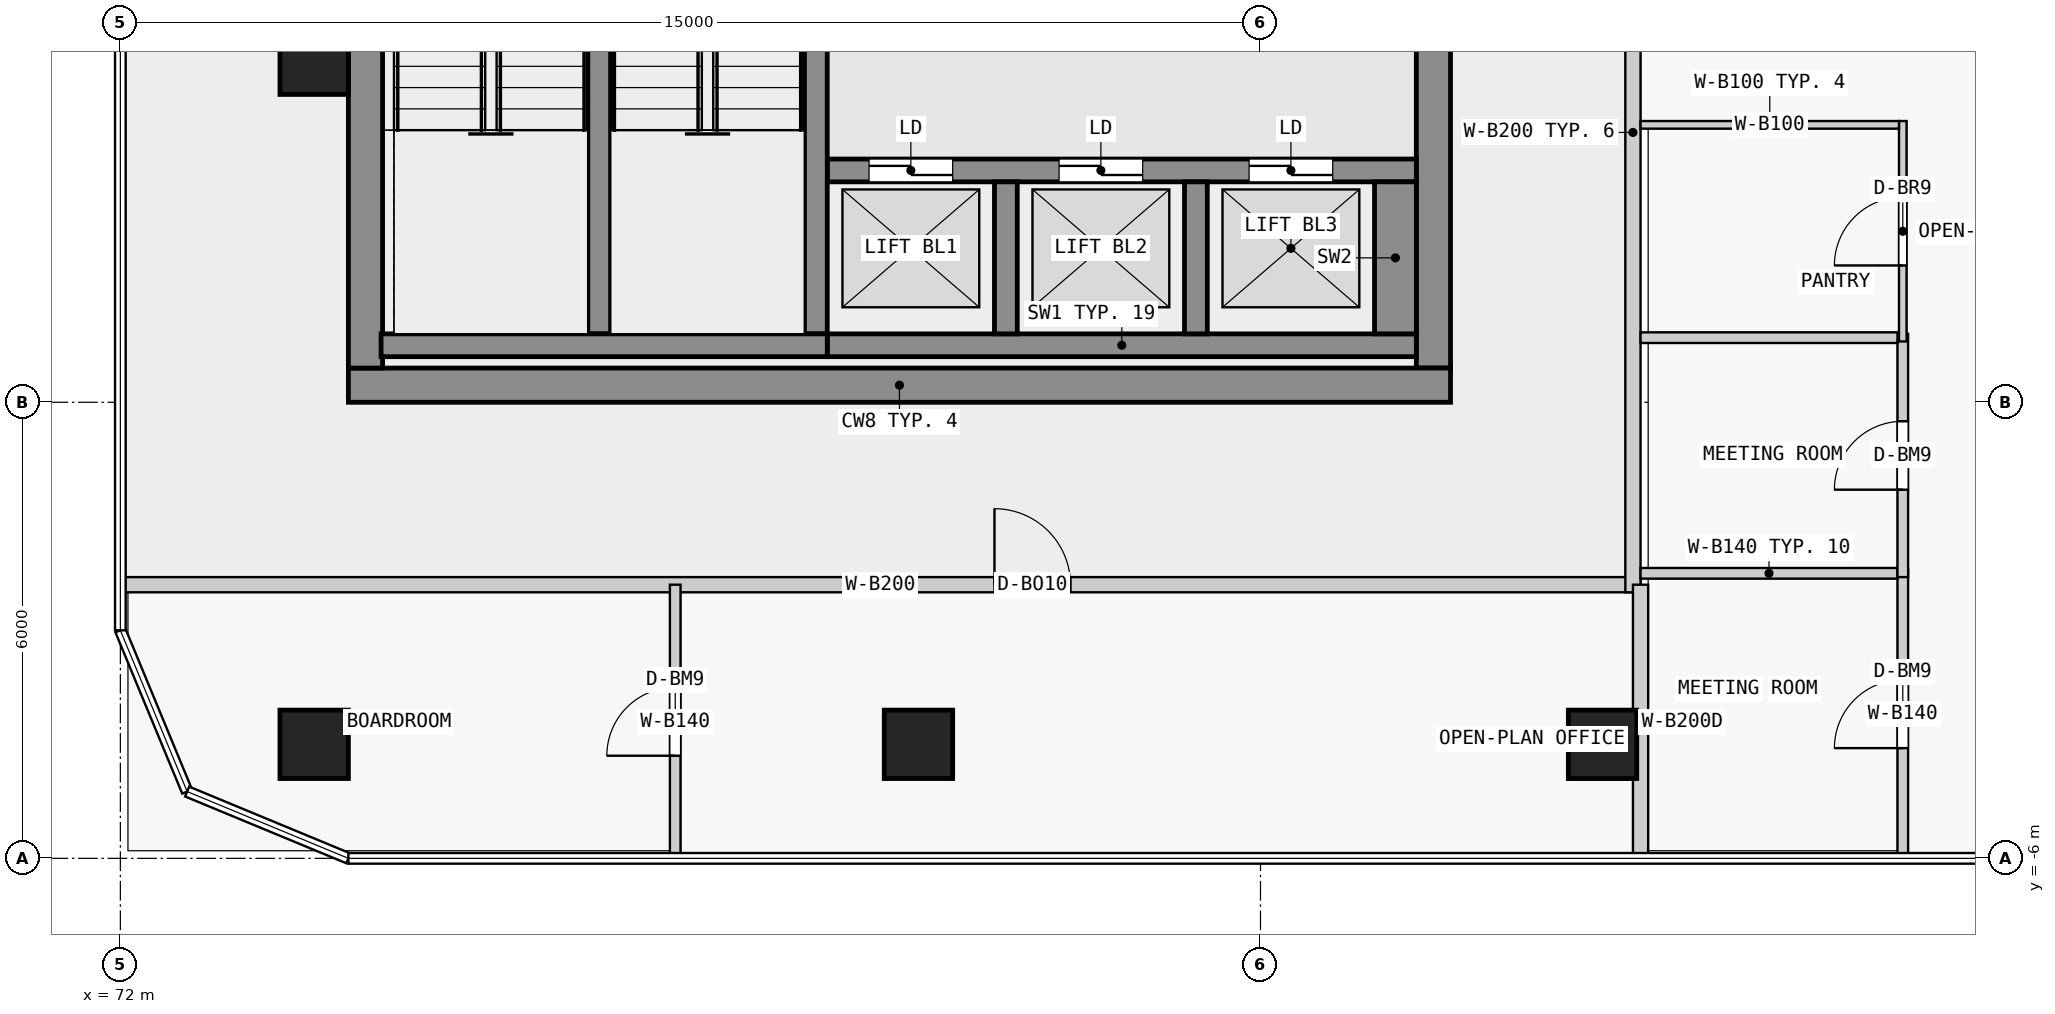
"""IFC4 building model, lengths in metres.
Left out: names, types, materials, properties, quantities, classifications, styles, units other than length and angle.
Written with IfcOpenShell. Run it as: python <this file> out.ifc"""

import sys

from ifc_helpers import new_model, si_unit, direction, frame, frame_2d, origin, origin_2d, place, context, subcontext, project, spatial, rectangle, extrude, element, fill, save


model = new_model("IFC4")
c1 = context("Model", 3, precision=1e-05, world=origin(), true_north=direction((0.0, 1.0)))
c2 = subcontext(c1, "Body", "Model", "MODEL_VIEW")
j1 = project(units=[si_unit("LENGTHUNIT", "METRE"), si_unit("PLANEANGLEUNIT", "RADIAN")], contexts=[c1])
p1 = place(None, origin())
s1 = spatial("IfcSite", under=j1, at=p1, CompositionType="ELEMENT")
p2 = place(p1, origin())
s2 = spatial("IfcBuilding", under=s1, at=p2, CompositionType="ELEMENT")
p3 = place(p2, frame((0.0, 0.0, 78.3)))
s3 = spatial("IfcBuildingStorey", under=s2, at=p3, CompositionType="ELEMENT", Elevation=78.3)
for number, where, z_axis, x_axis in (
    (1, (74.55, -4.5, 0.0), (0.0, 0.0, 1.0), (1.0, 0.0, 0.0)),
    (2, (82.5, -4.5, 0.0), (0.0, 0.0, 1.0), (1.0, 0.0, 0.0)),
    (3, (91.5, -4.5, 0.0), (0.0, 0.0, 1.0), (1.0, 0.0, 0.0)),
    (4, (74.55, 4.5, 0.0), (0.0, 0.0, 1.0), (1.0, 0.0, 0.0)),
):
    element("IfcColumn", number, at=place(p3, frame(where, z_axis=z_axis, x_axis=x_axis)), inside=s3, PredefinedType="COLUMN", context=c2, shape_type="SweptSolid", body=[
        extrude(rectangle(XDim=0.9, YDim=0.9, at=origin_2d()), origin(), (0.0, 0.0, 1.0), 3.5),
    ])
p4 = place(p3, frame((75.0, 0.225, 0.0), z_axis=(0.0, 0.0, 1.0), x_axis=(1.0, 0.0, 0.0)))
e5 = element("IfcWall", 5, at=p4, inside=s3, PredefinedType="SHEAR", context=c2, shape_type="SweptSolid", body=[
    extrude(rectangle(XDim=14.5, YDim=0.45, at=frame_2d((7.25, 0.0))), origin(), (0.0, 0.0, 1.0), 3.25),
])
p5 = place(p3, frame((75.225, 0.45, 0.0), z_axis=(0.0, 0.0, 1.0), x_axis=(0.0, 1.0, 0.0)))
e6 = element("IfcWall", 6, at=p5, inside=s3, PredefinedType="SHEAR", context=c2, shape_type="SweptSolid", body=[
    extrude(rectangle(XDim=17.1, YDim=0.45, at=frame_2d((8.55, 0.0))), origin(), (0.0, 0.0, 1.0), 3.25),
])
p6 = place(p5, frame((7.875, 0.0, 0.0)))
e7 = element("IfcOpeningElement", 7, at=p6, cuts=e6, PredefinedType="OPENING", context=c2, shape_type="SweptSolid", body=[
    extrude(rectangle(XDim=1.8, YDim=2.1, at=frame_2d((0.9, 1.05))), frame((0.0, 0.235, 0.0), z_axis=(0.0, -1.0, 0.0), x_axis=(1.0, 0.0, 0.0)), (0.0, 0.0, 1.0), 0.47),
])
p7 = place(p3, frame((89.275, 0.45, 0.0), z_axis=(0.0, 0.0, 1.0), x_axis=(0.0, 1.0, 0.0)))
e8 = element("IfcWall", 8, at=p7, inside=s3, PredefinedType="SHEAR", context=c2, shape_type="SweptSolid", body=[
    extrude(rectangle(XDim=17.1, YDim=0.45, at=frame_2d((8.55, 0.0))), origin(), (0.0, 0.0, 1.0), 3.25),
])
p8 = place(p7, frame((7.65, 0.0, 0.0)))
e9 = element("IfcOpeningElement", 9, at=p8, cuts=e8, PredefinedType="OPENING", context=c2, shape_type="SweptSolid", body=[
    extrude(rectangle(XDim=1.8, YDim=2.1, at=frame_2d((0.9, 1.05))), frame((0.0, 0.235, 0.0), z_axis=(0.0, -1.0, 0.0), x_axis=(1.0, 0.0, 0.0)), (0.0, 0.0, 1.0), 0.47),
])
p9 = place(p7, frame((15.65, 0.0, 0.0)))
e10 = element("IfcOpeningElement", 10, at=p9, cuts=e8, PredefinedType="OPENING", context=c2, shape_type="SweptSolid", body=[
    extrude(rectangle(XDim=0.9, YDim=2.1, at=frame_2d((0.45, 1.05))), frame((0.0, 0.235, 0.0), z_axis=(0.0, -1.0, 0.0), x_axis=(1.0, 0.0, 0.0)), (0.0, 0.0, 1.0), 0.47),
])
p10 = place(p3, frame((75.43, 0.75, 0.0), z_axis=(0.0, 0.0, 1.0), x_axis=(1.0, 0.0, 0.0)))
e11 = element("IfcWall", 11, at=p10, inside=s3, PredefinedType="SHEAR", context=c2, shape_type="SweptSolid", body=[
    extrude(rectangle(XDim=5.87, YDim=0.3, at=frame_2d((2.935, 0.0))), origin(), (0.0, 0.0, 1.0), 3.25),
])
for number, where, z_axis, x_axis in (
    (12, (78.3, 0.9, 0.0), (0.0, 0.0, 1.0), (0.0, 1.0, 0.0)),
    (13, (81.15, 0.9, 0.0), (0.0, 0.0, 1.0), (0.0, 1.0, 0.0)),
):
    element("IfcWall", number, at=place(p3, frame(where, z_axis=z_axis, x_axis=x_axis)), inside=s3, PredefinedType="SHEAR", context=c2, shape_type="SweptSolid", body=[
        extrude(rectangle(XDim=6.4, YDim=0.3, at=frame_2d((3.2, 0.0))), origin(), (0.0, 0.0, 1.0), 3.25),
    ])
p11 = place(p3, frame((81.3, 0.75, 0.0), z_axis=(0.0, 0.0, 1.0), x_axis=(1.0, 0.0, 0.0)))
e14 = element("IfcWall", 14, at=p11, inside=s3, PredefinedType="SHEAR", context=c2, shape_type="SweptSolid", body=[
    extrude(rectangle(XDim=7.75, YDim=0.3, at=frame_2d((3.875, 0.0))), origin(), (0.0, 0.0, 1.0), 3.25),
])
for number, where, z_axis, x_axis in (
    (15, (83.65, 0.9, 0.0), (0.0, 0.0, 1.0), (0.0, 1.0, 0.0)),
    (16, (86.15, 0.9, 0.0), (0.0, 0.0, 1.0), (0.0, 1.0, 0.0)),
):
    element("IfcWall", number, at=place(p3, frame(where, z_axis=z_axis, x_axis=x_axis)), inside=s3, PredefinedType="SHEAR", context=c2, shape_type="SweptSolid", body=[
        extrude(rectangle(XDim=2.0, YDim=0.3, at=frame_2d((1.0, 0.0))), origin(), (0.0, 0.0, 1.0), 3.25),
    ])
p12 = place(p3, frame((88.775, 0.9, 0.0), z_axis=(0.0, 0.0, 1.0), x_axis=(0.0, 1.0, 0.0)))
e17 = element("IfcWall", 17, at=p12, inside=s3, PredefinedType="SHEAR", context=c2, shape_type="SweptSolid", body=[
    extrude(rectangle(XDim=2.0, YDim=0.55, at=frame_2d((1.0, 0.0))), origin(), (0.0, 0.0, 1.0), 3.25),
])
p13 = place(p3, frame((81.3, 3.05, 0.0), z_axis=(0.0, 0.0, 1.0), x_axis=(1.0, 0.0, 0.0)))
e18 = element("IfcWall", 18, at=p13, inside=s3, PredefinedType="SHEAR", context=c2, shape_type="SweptSolid", body=[
    extrude(rectangle(XDim=7.75, YDim=0.3, at=frame_2d((3.875, 0.0))), origin(), (0.0, 0.0, 1.0), 3.25),
])
p14 = place(p13, frame((0.55, 0.0, 0.0)))
e19 = element("IfcOpeningElement", 19, at=p14, cuts=e18, PredefinedType="OPENING", context=c2, shape_type="SweptSolid", body=[
    extrude(rectangle(XDim=1.1, YDim=2.1, at=frame_2d((0.55, 1.05))), frame((0.0, 0.16, 0.0), z_axis=(0.0, -1.0, 0.0), x_axis=(1.0, 0.0, 0.0)), (0.0, 0.0, 1.0), 0.32),
])
p15 = place(p13, frame((3.05, 0.0, 0.0)))
e20 = element("IfcOpeningElement", 20, at=p15, cuts=e18, PredefinedType="OPENING", context=c2, shape_type="SweptSolid", body=[
    extrude(rectangle(XDim=1.1, YDim=2.1, at=frame_2d((0.55, 1.05))), frame((0.0, 0.16, 0.0), z_axis=(0.0, -1.0, 0.0), x_axis=(1.0, 0.0, 0.0)), (0.0, 0.0, 1.0), 0.32),
])
p16 = place(p13, frame((5.55, 0.0, 0.0)))
e21 = element("IfcOpeningElement", 21, at=p16, cuts=e18, PredefinedType="OPENING", context=c2, shape_type="SweptSolid", body=[
    extrude(rectangle(XDim=1.1, YDim=2.1, at=frame_2d((0.55, 1.05))), frame((0.0, 0.16, 0.0), z_axis=(0.0, -1.0, 0.0), x_axis=(1.0, 0.0, 0.0)), (0.0, 0.0, 1.0), 0.32),
])
p17 = place(p3, frame((72.0, -2.4, 0.0), z_axis=(0.0, 0.0, 1.0), x_axis=(1.0, 0.0, 0.0)))
e22 = element("IfcWall", 22, at=p17, inside=s3, PredefinedType="PARTITIONING", context=c2, shape_type="SweptSolid", body=[
    extrude(rectangle(XDim=20.0, YDim=0.2, at=frame_2d((10.0, 0.0))), origin(), (0.0, 0.0, 1.0), 3.25),
])
p18 = place(p17, frame((11.5, 0.0, 0.0)))
e23 = element("IfcOpeningElement", 23, at=p18, cuts=e22, PredefinedType="OPENING", context=c2, shape_type="SweptSolid", body=[
    extrude(rectangle(XDim=1.0, YDim=2.4, at=frame_2d((0.5, 1.2))), frame((0.0, 0.11, 0.0), z_axis=(0.0, -1.0, 0.0), x_axis=(1.0, 0.0, 0.0)), (0.0, 0.0, 1.0), 0.22),
])
p19 = place(p3, frame((91.9, -2.5, 0.0), z_axis=(0.0, 0.0, 1.0), x_axis=(0.0, 1.0, 0.0)))
e24 = element("IfcWall", 24, at=p19, inside=s3, PredefinedType="PARTITIONING", context=c2, shape_type="SweptSolid", body=[
    extrude(rectangle(XDim=12.1, YDim=0.2, at=frame_2d((6.05, 0.0))), origin(), (0.0, 0.0, 1.0), 3.25),
])
p20 = place(p19, frame((8.3, 0.0, 0.0)))
e25 = element("IfcOpeningElement", 25, at=p20, cuts=e24, PredefinedType="OPENING", context=c2, shape_type="SweptSolid", body=[
    extrude(rectangle(XDim=1.4, YDim=2.4, at=frame_2d((0.7, 1.2))), frame((0.0, 0.11, 0.0), z_axis=(0.0, -1.0, 0.0), x_axis=(1.0, 0.0, 0.0)), (0.0, 0.0, 1.0), 0.22),
])
p21 = place(p3, frame((92.0, -6.0, 0.0), z_axis=(0.0, 0.0, 1.0), x_axis=(0.0, 1.0, 0.0)))
e26 = element("IfcWall", 26, at=p21, inside=s3, PredefinedType="PARTITIONING", context=c2, shape_type="SweptSolid", body=[
    extrude(rectangle(XDim=3.6, YDim=0.2, at=frame_2d((1.8, 0.0))), origin(), (0.0, 0.0, 1.0), 3.25),
])
p22 = place(p3, frame((79.3, -6.0, 0.0), z_axis=(0.0, 0.0, 1.0), x_axis=(0.0, 1.0, 0.0)))
e27 = element("IfcWall", 27, at=p22, inside=s3, PredefinedType="PARTITIONING", context=c2, shape_type="SweptSolid", body=[
    extrude(rectangle(XDim=3.6, YDim=0.14, at=frame_2d((1.8, 0.0))), origin(), (0.0, 0.0, 1.0), 3.25),
])
p23 = place(p22, frame((1.35, 0.0, 0.0)))
e28 = element("IfcOpeningElement", 28, at=p23, cuts=e27, PredefinedType="OPENING", context=c2, shape_type="SweptSolid", body=[
    extrude(rectangle(XDim=0.9, YDim=2.4, at=frame_2d((0.45, 1.2))), frame((0.0, 0.08, 0.0), z_axis=(0.0, -1.0, 0.0), x_axis=(1.0, 0.0, 0.0)), (0.0, 0.0, 1.0), 0.16),
])
p24 = place(p3, frame((95.45, -6.0, 0.0), z_axis=(0.0, 0.0, 1.0), x_axis=(0.0, 1.0, 0.0)))
e29 = element("IfcWall", 29, at=p24, inside=s3, PredefinedType="PARTITIONING", context=c2, shape_type="SweptSolid", body=[
    extrude(rectangle(XDim=3.8, YDim=0.14, at=frame_2d((1.9, 0.0))), origin(), (0.0, 0.0, 1.0), 3.25),
])
p25 = place(p24, frame((1.45, 0.0, 0.0)))
e30 = element("IfcOpeningElement", 30, at=p25, cuts=e29, PredefinedType="OPENING", context=c2, shape_type="SweptSolid", body=[
    extrude(rectangle(XDim=0.9, YDim=2.4, at=frame_2d((0.45, 1.2))), frame((0.0, 0.08, 0.0), z_axis=(0.0, -1.0, 0.0), x_axis=(1.0, 0.0, 0.0)), (0.0, 0.0, 1.0), 0.16),
])
p26 = place(p3, frame((92.0, -2.25, 0.0), z_axis=(0.0, 0.0, 1.0), x_axis=(1.0, 0.0, 0.0)))
e31 = element("IfcWall", 31, at=p26, inside=s3, PredefinedType="PARTITIONING", context=c2, shape_type="SweptSolid", body=[
    extrude(rectangle(XDim=3.38, YDim=0.14, at=frame_2d((1.69, 0.0))), origin(), (0.0, 0.0, 1.0), 3.25),
])
p27 = place(p3, frame((95.45, -2.3, 0.0), z_axis=(0.0, 0.0, 1.0), x_axis=(0.0, 1.0, 0.0)))
e32 = element("IfcWall", 32, at=p27, inside=s3, PredefinedType="PARTITIONING", context=c2, shape_type="SweptSolid", body=[
    extrude(rectangle(XDim=3.2, YDim=0.14, at=frame_2d((1.6, 0.0))), origin(), (0.0, 0.0, 1.0), 3.25),
])
p28 = place(p27, frame((1.15, 0.0, 0.0)))
e33 = element("IfcOpeningElement", 33, at=p28, cuts=e32, PredefinedType="OPENING", context=c2, shape_type="SweptSolid", body=[
    extrude(rectangle(XDim=0.9, YDim=2.4, at=frame_2d((0.45, 1.2))), frame((0.0, 0.08, 0.0), z_axis=(0.0, -1.0, 0.0), x_axis=(1.0, 0.0, 0.0)), (0.0, 0.0, 1.0), 0.16),
])
p29 = place(p3, frame((92.0, 0.85, 0.0), z_axis=(0.0, 0.0, 1.0), x_axis=(1.0, 0.0, 0.0)))
e34 = element("IfcWall", 34, at=p29, inside=s3, PredefinedType="PARTITIONING", context=c2, shape_type="SweptSolid", body=[
    extrude(rectangle(XDim=3.38, YDim=0.14, at=frame_2d((1.69, 0.0))), origin(), (0.0, 0.0, 1.0), 3.25),
])
p30 = place(p3, frame((95.45, 0.8, 0.0), z_axis=(0.0, 0.0, 1.0), x_axis=(0.0, 1.0, 0.0)))
e35 = element("IfcWall", 35, at=p30, inside=s3, PredefinedType="PARTITIONING", context=c2, shape_type="SweptSolid", body=[
    extrude(rectangle(XDim=2.9, YDim=0.1, at=frame_2d((1.45, 0.0))), origin(), (0.0, 0.0, 1.0), 3.25),
])
p31 = place(p30, frame((1.0, 0.0, 0.0)))
e36 = element("IfcOpeningElement", 36, at=p31, cuts=e35, PredefinedType="OPENING", context=c2, shape_type="SweptSolid", body=[
    extrude(rectangle(XDim=0.9, YDim=2.1, at=frame_2d((0.45, 1.05))), frame((0.0, 0.06, 0.0), z_axis=(0.0, -1.0, 0.0), x_axis=(1.0, 0.0, 0.0)), (0.0, 0.0, 1.0), 0.12),
])
p32 = place(p3, frame((92.0, 3.65, 0.0), z_axis=(0.0, 0.0, 1.0), x_axis=(1.0, 0.0, 0.0)))
e37 = element("IfcWall", 37, at=p32, inside=s3, PredefinedType="PARTITIONING", context=c2, shape_type="SweptSolid", body=[
    extrude(rectangle(XDim=3.4, YDim=0.1, at=frame_2d((1.7, 0.0))), origin(), (0.0, 0.0, 1.0), 3.25),
])
p33 = place(p14, origin())
e38 = element("IfcDoor", 38, at=p33, inside=s3, OperationType="DOUBLE_DOOR_SLIDING", PredefinedType="DOOR", context=c2, shape_type="SweptSolid", body=[
    extrude(rectangle(XDim=1.1, YDim=2.1, at=frame_2d((0.55, 1.05))), frame((0.0, 0.025, 0.0), z_axis=(0.0, -1.0, 0.0), x_axis=(1.0, 0.0, 0.0)), (0.0, 0.0, 1.0), 0.05),
])
fill(e19, e38)
p34 = place(p15, origin())
e39 = element("IfcDoor", 39, at=p34, inside=s3, OperationType="DOUBLE_DOOR_SLIDING", PredefinedType="DOOR", context=c2, shape_type="SweptSolid", body=[
    extrude(rectangle(XDim=1.1, YDim=2.1, at=frame_2d((0.55, 1.05))), frame((0.0, 0.025, 0.0), z_axis=(0.0, -1.0, 0.0), x_axis=(1.0, 0.0, 0.0)), (0.0, 0.0, 1.0), 0.05),
])
fill(e20, e39)
p35 = place(p16, origin())
e40 = element("IfcDoor", 40, at=p35, inside=s3, OperationType="DOUBLE_DOOR_SLIDING", PredefinedType="DOOR", context=c2, shape_type="SweptSolid", body=[
    extrude(rectangle(XDim=1.1, YDim=2.1, at=frame_2d((0.55, 1.05))), frame((0.0, 0.025, 0.0), z_axis=(0.0, -1.0, 0.0), x_axis=(1.0, 0.0, 0.0)), (0.0, 0.0, 1.0), 0.05),
])
fill(e21, e40)
p36 = place(p18, origin())
e41 = element("IfcDoor", 41, at=p36, inside=s3, OperationType="SINGLE_SWING_LEFT", PredefinedType="DOOR", context=c2, shape_type="SweptSolid", body=[
    extrude(rectangle(XDim=1.0, YDim=2.4, at=frame_2d((0.5, 1.2))), frame((0.0, 0.025, 0.0), z_axis=(0.0, -1.0, 0.0), x_axis=(1.0, 0.0, 0.0)), (0.0, 0.0, 1.0), 0.05),
])
fill(e23, e41)
p37 = place(p23, origin())
e42 = element("IfcDoor", 42, at=p37, inside=s3, OperationType="SINGLE_SWING_LEFT", PredefinedType="DOOR", context=c2, shape_type="SweptSolid", body=[
    extrude(rectangle(XDim=0.9, YDim=2.4, at=frame_2d((0.45, 1.2))), frame((0.0, 0.025, 0.0), z_axis=(0.0, -1.0, 0.0), x_axis=(1.0, 0.0, 0.0)), (0.0, 0.0, 1.0), 0.05),
])
fill(e28, e42)
p38 = place(p25, origin())
e43 = element("IfcDoor", 43, at=p38, inside=s3, OperationType="SINGLE_SWING_LEFT", PredefinedType="DOOR", context=c2, shape_type="SweptSolid", body=[
    extrude(rectangle(XDim=0.9, YDim=2.4, at=frame_2d((0.45, 1.2))), frame((0.0, 0.025, 0.0), z_axis=(0.0, -1.0, 0.0), x_axis=(1.0, 0.0, 0.0)), (0.0, 0.0, 1.0), 0.05),
])
fill(e30, e43)
p39 = place(p28, origin())
e44 = element("IfcDoor", 44, at=p39, inside=s3, OperationType="SINGLE_SWING_LEFT", PredefinedType="DOOR", context=c2, shape_type="SweptSolid", body=[
    extrude(rectangle(XDim=0.9, YDim=2.4, at=frame_2d((0.45, 1.2))), frame((0.0, 0.025, 0.0), z_axis=(0.0, -1.0, 0.0), x_axis=(1.0, 0.0, 0.0)), (0.0, 0.0, 1.0), 0.05),
])
fill(e33, e44)
p40 = place(p31, origin())
e45 = element("IfcDoor", 45, at=p40, inside=s3, OperationType="SINGLE_SWING_LEFT", PredefinedType="DOOR", context=c2, shape_type="SweptSolid", body=[
    extrude(rectangle(XDim=0.9, YDim=2.1, at=frame_2d((0.45, 1.05))), frame((0.0, 0.025, 0.0), z_axis=(0.0, -1.0, 0.0), x_axis=(1.0, 0.0, 0.0)), (0.0, 0.0, 1.0), 0.05),
])
fill(e36, e45)
save(model, sys.argv[1])
